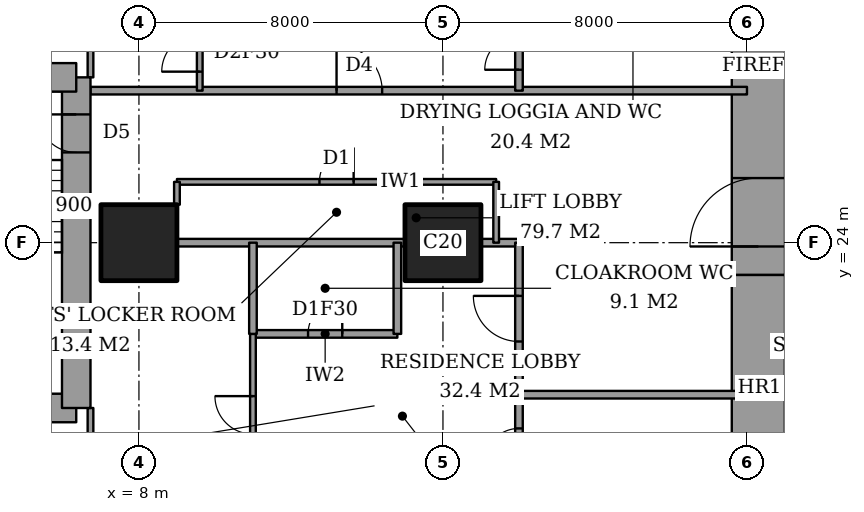
"""IFC4 building model, lengths in metres.
Left out: names, types, materials, properties, quantities, classifications, styles, units other than length and angle.
Written with IfcOpenShell. Run it as: python <this file> out.ifc"""

import sys

from ifc_helpers import new_model, si_unit, direction, frame, frame_2d, origin, origin_2d, place, context, subcontext, project, spatial, rectangle, extrude, element, fill, save


model = new_model("IFC4")
c1 = context("Model", 3, precision=1e-05, world=origin(), true_north=direction((0.0, 1.0)))
c2 = subcontext(c1, "Body", "Model", "MODEL_VIEW")
j1 = project(units=[si_unit("LENGTHUNIT", "METRE"), si_unit("PLANEANGLEUNIT", "RADIAN")], contexts=[c1])
p1 = place(None, origin())
s1 = spatial("IfcSite", under=j1, at=p1, CompositionType="ELEMENT")
p2 = place(p1, origin())
s2 = spatial("IfcBuilding", under=s1, at=p2, CompositionType="ELEMENT")
p3 = place(p2, frame((0.0, 0.0, 146.6)))
s3 = spatial("IfcBuildingStorey", under=s2, at=p3, CompositionType="ELEMENT", Elevation=146.6)
for number, where, z_axis, x_axis in (
    (1, (8.0, 24.0, 0.0), (0.0, 0.0, 1.0), (1.0, 0.0, 0.0)),
    (2, (16.0, 24.0, 0.0), (0.0, 0.0, 1.0), (1.0, 0.0, 0.0)),
):
    element("IfcColumn", number, at=place(p3, frame(where, z_axis=z_axis, x_axis=x_axis)), inside=s3, PredefinedType="COLUMN", context=c2, shape_type="SweptSolid", body=[
        extrude(rectangle(XDim=2.0, YDim=2.0, at=origin_2d()), origin(), (0.0, 0.0, 1.0), 3.6),
    ])
p4 = place(p3, frame((24.3, 13.0, 0.0), z_axis=(0.0, 0.0, 1.0), x_axis=(0.0, 1.0, 0.0)))
e3 = element("IfcWall", 3, at=p4, inside=s3, PredefinedType="SHEAR", context=c2, shape_type="SweptSolid", body=[
    extrude(rectangle(XDim=10.15, YDim=1.4, at=frame_2d((5.075, 0.0))), origin(), (0.0, 0.0, 1.0), 3.6),
])
p5 = place(p3, frame((24.3, 23.15, 0.0), z_axis=(0.0, 0.0, 1.0), x_axis=(0.0, 1.0, 0.0)))
e4 = element("IfcWall", 4, at=p5, inside=s3, PredefinedType="SHEAR", context=c2, shape_type="SweptSolid", body=[
    extrude(rectangle(XDim=11.85, YDim=1.4, at=frame_2d((5.925, 0.0))), origin(), (0.0, 0.0, 1.0), 3.6),
])
p6 = place(p5, frame((0.75, 0.0, 0.0)))
e5 = element("IfcOpeningElement", 5, at=p6, cuts=e4, PredefinedType="OPENING", context=c2, shape_type="SweptSolid", body=[
    extrude(rectangle(XDim=1.8, YDim=2.4, at=frame_2d((0.9, 1.2))), frame((0.0, 0.71, 0.0), z_axis=(0.0, -1.0, 0.0), x_axis=(1.0, 0.0, 0.0)), (0.0, 0.0, 1.0), 1.42),
])
p7 = place(p3, frame((1.9, 19.65, 0.0), z_axis=(0.0, 0.0, 1.0), x_axis=(1.0, 0.0, 0.0)))
e6 = element("IfcWall", 6, at=p7, inside=s3, PredefinedType="SHEAR", context=c2, shape_type="SweptSolid", body=[
    extrude(rectangle(XDim=4.45, YDim=0.75, at=frame_2d((2.225, 0.0))), origin(), (0.0, 0.0, 1.0), 3.6),
])
p8 = place(p3, frame((6.35, 19.65, 0.0), z_axis=(0.0, 0.0, 1.0), x_axis=(0.0, 1.0, 0.0)))
e7 = element("IfcWall", 7, at=p8, inside=s3, PredefinedType="SHEAR", context=c2, shape_type="SweptSolid", body=[
    extrude(rectangle(XDim=8.7, YDim=0.75, at=frame_2d((4.35, 0.0))), origin(), (0.0, 0.0, 1.0), 3.6),
])
p9 = place(p8, frame((6.725, 0.0, 0.0)))
e8 = element("IfcOpeningElement", 8, at=p9, cuts=e7, PredefinedType="OPENING", context=c2, shape_type="SweptSolid", body=[
    extrude(rectangle(XDim=1.0, YDim=2.1, at=frame_2d((0.5, 1.05))), frame((0.0, 0.385, 0.0), z_axis=(0.0, -1.0, 0.0), x_axis=(1.0, 0.0, 0.0)), (0.0, 0.0, 1.0), 0.77),
])
p10 = place(p3, frame((6.35, 28.35, 0.0), z_axis=(0.0, 0.0, 1.0), x_axis=(-1.0, 0.0, 0.0)))
e9 = element("IfcWall", 9, at=p10, inside=s3, PredefinedType="SHEAR", context=c2, shape_type="SweptSolid", body=[
    extrude(rectangle(XDim=4.45, YDim=0.75, at=frame_2d((2.225, 0.0))), origin(), (0.0, 0.0, 1.0), 3.6),
])
p11 = place(p3, frame((18.0, 20.0, 0.0), z_axis=(0.0, 0.0, 1.0), x_axis=(1.0, 0.0, 0.0)))
e10 = element("IfcWall", 10, at=p11, inside=s3, PredefinedType="PARTITIONING", context=c2, shape_type="SweptSolid", body=[
    extrude(rectangle(XDim=6.0, YDim=0.2, at=frame_2d((3.0, 0.0))), origin(), (0.0, 0.0, 1.0), 3.35),
])
p12 = place(p3, frame((11.0, 21.6, 0.0), z_axis=(0.0, 0.0, 1.0), x_axis=(1.0, 0.0, 0.0)))
e11 = element("IfcWall", 11, at=p12, inside=s3, PredefinedType="PARTITIONING", context=c2, shape_type="SweptSolid", body=[
    extrude(rectangle(XDim=3.8, YDim=0.2, at=frame_2d((1.9, 0.0))), origin(), (0.0, 0.0, 1.0), 3.35),
])
p13 = place(p12, frame((1.45, 0.0, 0.0)))
e12 = element("IfcOpeningElement", 12, at=p13, cuts=e11, PredefinedType="OPENING", context=c2, shape_type="SweptSolid", body=[
    extrude(rectangle(XDim=0.9, YDim=2.1, at=frame_2d((0.45, 1.05))), frame((0.0, 0.11, 0.0), z_axis=(0.0, -1.0, 0.0), x_axis=(1.0, 0.0, 0.0)), (0.0, 0.0, 1.0), 0.22),
])
p14 = place(p3, frame((9.0, 24.0, 0.0), z_axis=(0.0, 0.0, 1.0), x_axis=(1.0, 0.0, 0.0)))
e13 = element("IfcWall", 13, at=p14, inside=s3, PredefinedType="PARTITIONING", context=c2, shape_type="SweptSolid", body=[
    extrude(rectangle(XDim=6.0, YDim=0.2, at=frame_2d((3.0, 0.0))), origin(), (0.0, 0.0, 1.0), 3.35),
])
p15 = place(p3, frame((17.0, 24.0, 0.0), z_axis=(0.0, 0.0, 1.0), x_axis=(1.0, 0.0, 0.0)))
e14 = element("IfcWall", 14, at=p15, inside=s3, PredefinedType="PARTITIONING", context=c2, shape_type="SweptSolid", body=[
    extrude(rectangle(XDim=1.0, YDim=0.2, at=frame_2d((0.5, 0.0))), origin(), (0.0, 0.0, 1.0), 3.35),
])
p16 = place(p3, frame((9.0, 25.6, 0.0), z_axis=(0.0, 0.0, 1.0), x_axis=(1.0, 0.0, 0.0)))
e15 = element("IfcWall", 15, at=p16, inside=s3, PredefinedType="PARTITIONING", context=c2, shape_type="SweptSolid", body=[
    extrude(rectangle(XDim=8.4, YDim=0.15, at=frame_2d((4.2, 0.0))), origin(), (0.0, 0.0, 1.0), 3.35),
])
p17 = place(p16, frame((3.75, 0.0, 0.0)))
e16 = element("IfcOpeningElement", 16, at=p17, cuts=e15, PredefinedType="OPENING", context=c2, shape_type="SweptSolid", body=[
    extrude(rectangle(XDim=0.9, YDim=2.1, at=frame_2d((0.45, 1.05))), frame((0.0, 0.085, 0.0), z_axis=(0.0, -1.0, 0.0), x_axis=(1.0, 0.0, 0.0)), (0.0, 0.0, 1.0), 0.17),
])
p18 = place(p3, frame((6.725, 28.0, 0.0), z_axis=(0.0, 0.0, 1.0), x_axis=(1.0, 0.0, 0.0)))
e17 = element("IfcWall", 17, at=p18, inside=s3, PredefinedType="PARTITIONING", context=c2, shape_type="SweptSolid", body=[
    extrude(rectangle(XDim=17.275, YDim=0.2, at=frame_2d((8.637, 0.0))), origin(), (0.0, 0.0, 1.0), 3.35),
])
p19 = place(p18, frame((6.475, 0.0, 0.0)))
e18 = element("IfcOpeningElement", 18, at=p19, cuts=e17, PredefinedType="OPENING", context=c2, shape_type="SweptSolid", body=[
    extrude(rectangle(XDim=1.2, YDim=2.4, at=frame_2d((0.6, 1.2))), frame((0.0, 0.11, 0.0), z_axis=(0.0, -1.0, 0.0), x_axis=(1.0, 0.0, 0.0)), (0.0, 0.0, 1.0), 0.22),
])
p20 = place(p3, frame((6.725, 17.2, 0.0), z_axis=(0.0, 0.0, 1.0), x_axis=(0.0, 1.0, 0.0)))
e19 = element("IfcWall", 19, at=p20, inside=s3, PredefinedType="PARTITIONING", context=c2, shape_type="SweptSolid", body=[
    extrude(rectangle(XDim=2.45, YDim=0.15, at=frame_2d((1.225, 0.0))), origin(), (0.0, 0.0, 1.0), 3.35),
])
p21 = place(p20, frame((0.587, 0.0, 0.0)))
e20 = element("IfcOpeningElement", 20, at=p21, cuts=e19, PredefinedType="OPENING", context=c2, shape_type="SweptSolid", body=[
    extrude(rectangle(XDim=0.9, YDim=2.1, at=frame_2d((0.45, 1.05))), frame((0.0, 0.085, 0.0), z_axis=(0.0, -1.0, 0.0), x_axis=(1.0, 0.0, 0.0)), (0.0, 0.0, 1.0), 0.17),
])
p22 = place(p3, frame((6.725, 28.35, 0.0), z_axis=(0.0, 0.0, 1.0), x_axis=(0.0, 1.0, 0.0)))
e21 = element("IfcWall", 21, at=p22, inside=s3, PredefinedType="PARTITIONING", context=c2, shape_type="SweptSolid", body=[
    extrude(rectangle(XDim=2.45, YDim=0.15, at=frame_2d((1.225, 0.0))), origin(), (0.0, 0.0, 1.0), 3.35),
])
p23 = place(p22, frame((0.913, 0.0, 0.0)))
e22 = element("IfcOpeningElement", 22, at=p23, cuts=e21, PredefinedType="OPENING", context=c2, shape_type="SweptSolid", body=[
    extrude(rectangle(XDim=1.0, YDim=2.1, at=frame_2d((0.5, 1.05))), frame((0.0, 0.085, 0.0), z_axis=(0.0, -1.0, 0.0), x_axis=(1.0, 0.0, 0.0)), (0.0, 0.0, 1.0), 0.17),
])
p24 = place(p3, frame((9.0, 25.0, 0.0), z_axis=(0.0, 0.0, 1.0), x_axis=(0.0, 1.0, 0.0)))
e23 = element("IfcWall", 23, at=p24, inside=s3, PredefinedType="PARTITIONING", context=c2, shape_type="SweptSolid", body=[
    extrude(rectangle(XDim=0.6, YDim=0.15, at=frame_2d((0.3, 0.0))), origin(), (0.0, 0.0, 1.0), 3.35),
])
p25 = place(p3, frame((9.6, 28.0, 0.0), z_axis=(0.0, 0.0, 1.0), x_axis=(0.0, 1.0, 0.0)))
e24 = element("IfcWall", 24, at=p25, inside=s3, PredefinedType="PARTITIONING", context=c2, shape_type="SweptSolid", body=[
    extrude(rectangle(XDim=9.4, YDim=0.15, at=frame_2d((4.7, 0.0))), origin(), (0.0, 0.0, 1.0), 3.35),
])
p26 = place(p25, frame((0.5, 0.0, 0.0)))
e25 = element("IfcOpeningElement", 25, at=p26, cuts=e24, PredefinedType="OPENING", context=c2, shape_type="SweptSolid", body=[
    extrude(rectangle(XDim=1.0, YDim=2.1, at=frame_2d((0.5, 1.05))), frame((0.0, 0.085, 0.0), z_axis=(0.0, -1.0, 0.0), x_axis=(1.0, 0.0, 0.0)), (0.0, 0.0, 1.0), 0.17),
])
p27 = place(p3, frame((11.0, 21.6, 0.0), z_axis=(0.0, 0.0, 1.0), x_axis=(0.0, 1.0, 0.0)))
e26 = element("IfcWall", 26, at=p27, inside=s3, PredefinedType="PARTITIONING", context=c2, shape_type="SweptSolid", body=[
    extrude(rectangle(XDim=2.4, YDim=0.2, at=frame_2d((1.2, 0.0))), origin(), (0.0, 0.0, 1.0), 3.35),
])
p28 = place(p3, frame((11.0, 11.0, 0.0), z_axis=(0.0, 0.0, 1.0), x_axis=(0.0, 1.0, 0.0)))
e27 = element("IfcWall", 27, at=p28, inside=s3, PredefinedType="PARTITIONING", context=c2, shape_type="SweptSolid", body=[
    extrude(rectangle(XDim=10.6, YDim=0.15, at=frame_2d((5.3, 0.0))), origin(), (0.0, 0.0, 1.0), 3.35),
])
p29 = place(p28, frame((7.962, 0.0, 0.0)))
e28 = element("IfcOpeningElement", 28, at=p29, cuts=e27, PredefinedType="OPENING", context=c2, shape_type="SweptSolid", body=[
    extrude(rectangle(XDim=1.0, YDim=2.1, at=frame_2d((0.5, 1.05))), frame((0.0, 0.085, 0.0), z_axis=(0.0, -1.0, 0.0), x_axis=(1.0, 0.0, 0.0)), (0.0, 0.0, 1.0), 0.17),
])
p30 = place(p3, frame((14.8, 21.6, 0.0), z_axis=(0.0, 0.0, 1.0), x_axis=(0.0, 1.0, 0.0)))
e29 = element("IfcWall", 29, at=p30, inside=s3, PredefinedType="PARTITIONING", context=c2, shape_type="SweptSolid", body=[
    extrude(rectangle(XDim=2.4, YDim=0.2, at=frame_2d((1.2, 0.0))), origin(), (0.0, 0.0, 1.0), 3.35),
])
p31 = place(p3, frame((17.4, 24.0, 0.0), z_axis=(0.0, 0.0, 1.0), x_axis=(0.0, 1.0, 0.0)))
e30 = element("IfcWall", 30, at=p31, inside=s3, PredefinedType="PARTITIONING", context=c2, shape_type="SweptSolid", body=[
    extrude(rectangle(XDim=1.6, YDim=0.15, at=frame_2d((0.8, 0.0))), origin(), (0.0, 0.0, 1.0), 3.35),
])
p32 = place(p3, frame((18.0, 17.325, 0.0), z_axis=(0.0, 0.0, 1.0), x_axis=(0.0, 1.0, 0.0)))
e31 = element("IfcWall", 31, at=p32, inside=s3, PredefinedType="PARTITIONING", context=c2, shape_type="SweptSolid", body=[
    extrude(rectangle(XDim=6.675, YDim=0.2, at=frame_2d((3.337, 0.0))), origin(), (0.0, 0.0, 1.0), 3.35),
])
p33 = place(p32, frame((4.075, 0.0, 0.0)))
e32 = element("IfcOpeningElement", 32, at=p33, cuts=e31, PredefinedType="OPENING", context=c2, shape_type="SweptSolid", body=[
    extrude(rectangle(XDim=1.2, YDim=2.4, at=frame_2d((0.6, 1.2))), frame((0.0, 0.11, 0.0), z_axis=(0.0, -1.0, 0.0), x_axis=(1.0, 0.0, 0.0)), (0.0, 0.0, 1.0), 0.22),
])
p34 = place(p32, frame((0.887, 0.0, 0.0)))
e33 = element("IfcOpeningElement", 33, at=p34, cuts=e31, PredefinedType="OPENING", context=c2, shape_type="SweptSolid", body=[
    extrude(rectangle(XDim=0.9, YDim=2.1, at=frame_2d((0.45, 1.05))), frame((0.0, 0.11, 0.0), z_axis=(0.0, -1.0, 0.0), x_axis=(1.0, 0.0, 0.0)), (0.0, 0.0, 1.0), 0.22),
])
p35 = place(p3, frame((18.0, 28.0, 0.0), z_axis=(0.0, 0.0, 1.0), x_axis=(0.0, 1.0, 0.0)))
e34 = element("IfcWall", 34, at=p35, inside=s3, PredefinedType="PARTITIONING", context=c2, shape_type="SweptSolid", body=[
    extrude(rectangle(XDim=3.4, YDim=0.2, at=frame_2d((1.7, 0.0))), origin(), (0.0, 0.0, 1.0), 3.35),
])
p36 = place(p35, frame((0.55, 0.0, 0.0)))
e35 = element("IfcOpeningElement", 35, at=p36, cuts=e34, PredefinedType="OPENING", context=c2, shape_type="SweptSolid", body=[
    extrude(rectangle(XDim=0.9, YDim=2.1, at=frame_2d((0.45, 1.05))), frame((0.0, 0.11, 0.0), z_axis=(0.0, -1.0, 0.0), x_axis=(1.0, 0.0, 0.0)), (0.0, 0.0, 1.0), 0.22),
])
p37 = place(p29, origin())
e36 = element("IfcDoor", 36, at=p37, inside=s3, OperationType="SINGLE_SWING_LEFT", PredefinedType="DOOR", context=c2, shape_type="SweptSolid", body=[
    extrude(rectangle(XDim=1.0, YDim=2.1, at=frame_2d((0.5, 1.05))), frame((0.0, 0.025, 0.0), z_axis=(0.0, -1.0, 0.0), x_axis=(1.0, 0.0, 0.0)), (0.0, 0.0, 1.0), 0.05),
])
fill(e28, e36)
p38 = place(p13, origin())
e37 = element("IfcDoor", 37, at=p38, inside=s3, OperationType="SINGLE_SWING_LEFT", PredefinedType="DOOR", context=c2, shape_type="SweptSolid", body=[
    extrude(rectangle(XDim=0.9, YDim=2.1, at=frame_2d((0.45, 1.05))), frame((0.0, 0.025, 0.0), z_axis=(0.0, -1.0, 0.0), x_axis=(1.0, 0.0, 0.0)), (0.0, 0.0, 1.0), 0.05),
])
fill(e12, e37)
p39 = place(p33, origin())
e38 = element("IfcDoor", 38, at=p39, inside=s3, OperationType="SINGLE_SWING_LEFT", PredefinedType="DOOR", context=c2, shape_type="SweptSolid", body=[
    extrude(rectangle(XDim=1.2, YDim=2.4, at=frame_2d((0.6, 1.2))), frame((0.0, 0.025, 0.0), z_axis=(0.0, -1.0, 0.0), x_axis=(1.0, 0.0, 0.0)), (0.0, 0.0, 1.0), 0.05),
])
fill(e32, e38)
p40 = place(p34, origin())
e39 = element("IfcDoor", 39, at=p40, inside=s3, OperationType="SINGLE_SWING_RIGHT", PredefinedType="DOOR", context=c2, shape_type="SweptSolid", body=[
    extrude(rectangle(XDim=0.9, YDim=2.1, at=frame_2d((0.45, 1.05))), frame((0.0, 0.025, 0.0), z_axis=(0.0, -1.0, 0.0), x_axis=(1.0, 0.0, 0.0)), (0.0, 0.0, 1.0), 0.05),
])
fill(e33, e39)
p41 = place(p26, origin())
e40 = element("IfcDoor", 40, at=p41, inside=s3, OperationType="SINGLE_SWING_RIGHT", PredefinedType="DOOR", context=c2, shape_type="SweptSolid", body=[
    extrude(rectangle(XDim=1.0, YDim=2.1, at=frame_2d((0.5, 1.05))), frame((0.0, 0.025, 0.0), z_axis=(0.0, -1.0, 0.0), x_axis=(1.0, 0.0, 0.0)), (0.0, 0.0, 1.0), 0.05),
])
fill(e25, e40)
p42 = place(p19, origin())
e41 = element("IfcDoor", 41, at=p42, inside=s3, OperationType="SINGLE_SWING_RIGHT", PredefinedType="DOOR", context=c2, shape_type="SweptSolid", body=[
    extrude(rectangle(XDim=1.2, YDim=2.4, at=frame_2d((0.6, 1.2))), frame((0.0, 0.025, 0.0), z_axis=(0.0, -1.0, 0.0), x_axis=(1.0, 0.0, 0.0)), (0.0, 0.0, 1.0), 0.05),
])
fill(e18, e41)
p43 = place(p36, origin())
e42 = element("IfcDoor", 42, at=p43, inside=s3, OperationType="SINGLE_SWING_RIGHT", PredefinedType="DOOR", context=c2, shape_type="SweptSolid", body=[
    extrude(rectangle(XDim=0.9, YDim=2.1, at=frame_2d((0.45, 1.05))), frame((0.0, 0.025, 0.0), z_axis=(0.0, -1.0, 0.0), x_axis=(1.0, 0.0, 0.0)), (0.0, 0.0, 1.0), 0.05),
])
fill(e35, e42)
p44 = place(p17, origin())
e43 = element("IfcDoor", 43, at=p44, inside=s3, OperationType="SINGLE_SWING_LEFT", PredefinedType="DOOR", context=c2, shape_type="SweptSolid", body=[
    extrude(rectangle(XDim=0.9, YDim=2.1, at=frame_2d((0.45, 1.05))), frame((0.0, 0.025, 0.0), z_axis=(0.0, -1.0, 0.0), x_axis=(1.0, 0.0, 0.0)), (0.0, 0.0, 1.0), 0.05),
])
fill(e16, e43)
p45 = place(p6, origin())
e44 = element("IfcDoor", 44, at=p45, inside=s3, OperationType="DOUBLE_DOOR_DOUBLE_SWING", PredefinedType="DOOR", context=c2, shape_type="SweptSolid", body=[
    extrude(rectangle(XDim=1.8, YDim=2.4, at=frame_2d((0.9, 1.2))), frame((0.0, 0.025, 0.0), z_axis=(0.0, -1.0, 0.0), x_axis=(1.0, 0.0, 0.0)), (0.0, 0.0, 1.0), 0.05),
])
fill(e5, e44)
p46 = place(p9, origin())
e45 = element("IfcDoor", 45, at=p46, inside=s3, OperationType="SINGLE_SWING_LEFT", PredefinedType="DOOR", context=c2, shape_type="SweptSolid", body=[
    extrude(rectangle(XDim=1.0, YDim=2.1, at=frame_2d((0.5, 1.05))), frame((0.0, 0.025, 0.0), z_axis=(0.0, -1.0, 0.0), x_axis=(1.0, 0.0, 0.0)), (0.0, 0.0, 1.0), 0.05),
])
fill(e8, e45)
save(model, sys.argv[1])
